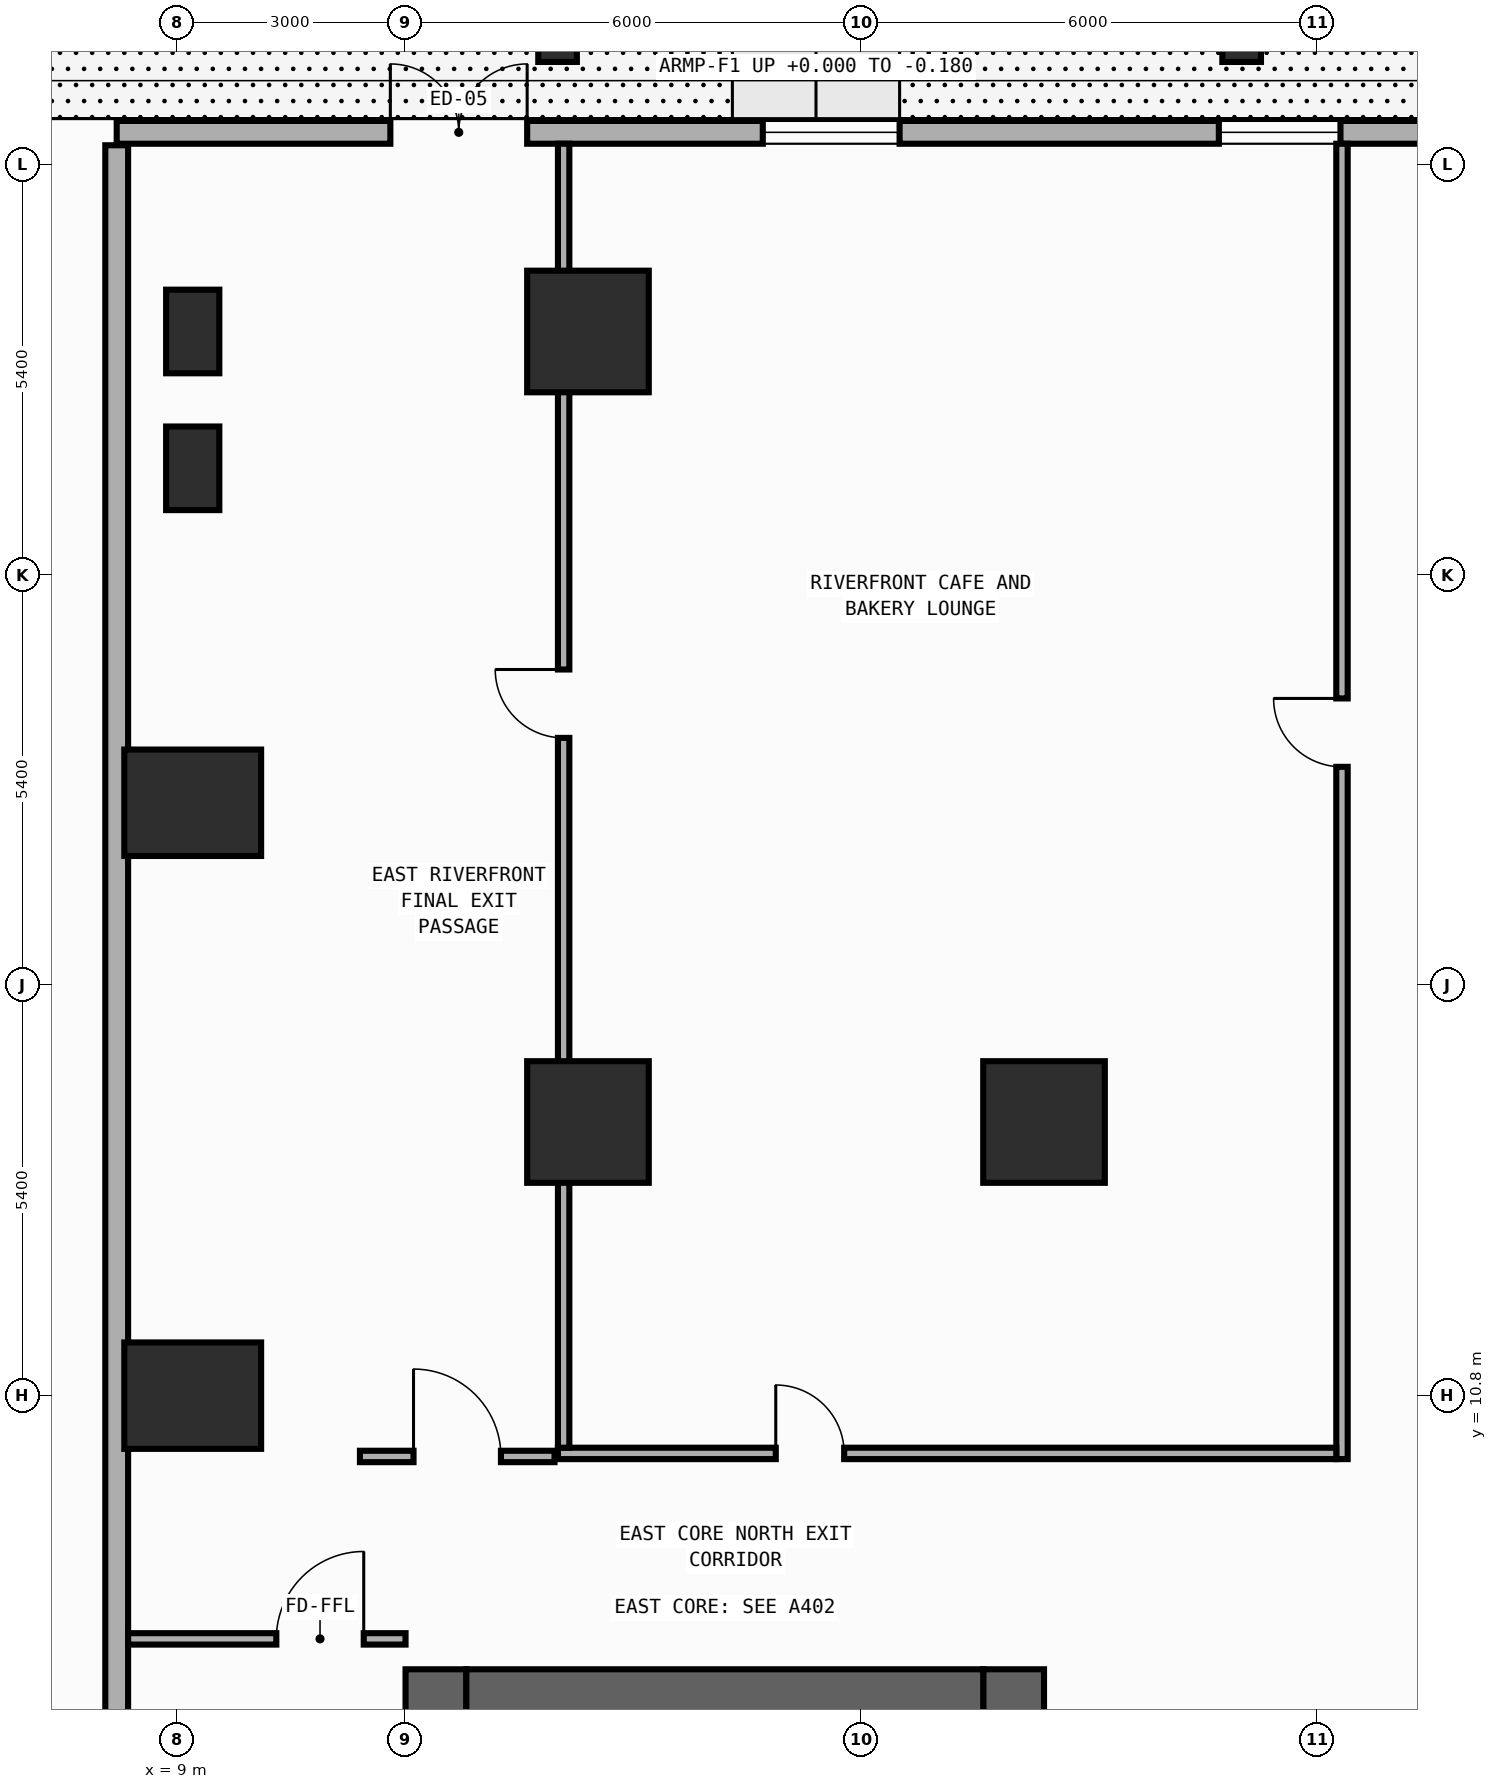
"""IFC4 building model, lengths in metres.
Left out: names, types, materials, properties, quantities, classifications, styles, units other than length and angle.
Written with IfcOpenShell. Run it as: python <this file> out.ifc"""

import sys

from ifc_helpers import new_model, si_unit, direction, frame, frame_2d, origin, origin_2d, place, context, subcontext, project, spatial, rectangle, hollow_circle, extrude, element, fill, save


model = new_model("IFC4")
c1 = context("Model", 3, precision=1e-05, world=origin(), true_north=direction((0.0, 1.0)))
c2 = subcontext(c1, "Body", "Model", "MODEL_VIEW")
j1 = project(units=[si_unit("LENGTHUNIT", "METRE"), si_unit("PLANEANGLEUNIT", "RADIAN")], contexts=[c1])
p1 = place(None, origin())
s1 = spatial("IfcSite", under=j1, at=p1, CompositionType="ELEMENT")
p2 = place(p1, origin())
s2 = spatial("IfcBuilding", under=s1, at=p2, CompositionType="ELEMENT")
p3 = place(p2, origin())
s3 = spatial("IfcBuildingStorey", under=s2, at=p3, CompositionType="ELEMENT", Elevation=0.0)
for number, where, z_axis, x_axis in (
    (1, (14.0, 28.6, -0.2), (0.0, 0.0, 1.0), (1.0, 0.0, 0.0)),
    (2, (23.0, 28.6, -0.2), (0.0, 0.0, 1.0), (1.0, 0.0, 0.0)),
):
    element("IfcColumn", number, at=place(p3, frame(where, z_axis=z_axis, x_axis=x_axis)), inside=s3, PredefinedType="COLUMN", context=c2, shape_type="SweptSolid", body=[
        extrude(hollow_circle(Radius=0.254, WallThickness=0.025, at=origin_2d()), origin(), (0.0, 0.0, 1.0), 5.6),
    ])
p4 = place(p3, frame((12.4, -19.8, 0.0), z_axis=(0.0, 0.0, 1.0), x_axis=(0.0, 1.0, 0.0)))
e3 = element("IfcWall", 3, at=p4, inside=s3, PredefinedType="SHEAR", context=c2, shape_type="SweptSolid", body=[
    extrude(rectangle(XDim=27.0, YDim=0.8, at=frame_2d((13.5, 0.0))), origin(), (0.0, 0.0, 1.0), 5.7),
])
p5 = place(p4, frame((23.05, 0.0, 0.0)))
e4 = element("IfcOpeningElement", 4, at=p5, cuts=e3, PredefinedType="OPENING", context=c2, shape_type="SweptSolid", body=[
    extrude(rectangle(XDim=1.1, YDim=2.2, at=frame_2d((0.55, 1.1))), frame((0.0, 0.41, 0.0), z_axis=(0.0, -1.0, 0.0), x_axis=(1.0, 0.0, 0.0)), (0.0, 0.0, 1.0), 0.82),
])
p6 = place(p4, frame((19.85, 0.0, 0.0)))
e5 = element("IfcOpeningElement", 5, at=p6, cuts=e3, PredefinedType="OPENING", context=c2, shape_type="SweptSolid", body=[
    extrude(rectangle(XDim=1.1, YDim=2.2, at=frame_2d((0.55, 1.1))), frame((0.0, 0.41, 0.0), z_axis=(0.0, -1.0, 0.0), x_axis=(1.0, 0.0, 0.0)), (0.0, 0.0, 1.0), 0.82),
])
p7 = place(p4, frame((16.65, 0.0, 0.0)))
e6 = element("IfcOpeningElement", 6, at=p7, cuts=e3, PredefinedType="OPENING", context=c2, shape_type="SweptSolid", body=[
    extrude(rectangle(XDim=1.1, YDim=2.2, at=frame_2d((0.55, 1.1))), frame((0.0, 0.41, 0.0), z_axis=(0.0, -1.0, 0.0), x_axis=(1.0, 0.0, 0.0)), (0.0, 0.0, 1.0), 0.82),
])
p8 = place(p4, frame((10.175, 0.0, 0.0)))
e7 = element("IfcOpeningElement", 7, at=p8, cuts=e3, PredefinedType="OPENING", context=c2, shape_type="SweptSolid", body=[
    extrude(rectangle(XDim=0.85, YDim=2.1, at=frame_2d((0.425, 1.05))), frame((0.0, 0.41, 0.0), z_axis=(0.0, -1.0, 0.0), x_axis=(1.0, 0.0, 0.0)), (0.0, 0.0, 1.0), 0.82),
])
p9 = place(p4, frame((12.725, 0.0, 0.0)))
e8 = element("IfcOpeningElement", 8, at=p9, cuts=e3, PredefinedType="OPENING", context=c2, shape_type="SweptSolid", body=[
    extrude(rectangle(XDim=1.15, YDim=2.2, at=frame_2d((0.575, 1.1))), frame((0.0, 0.41, 0.0), z_axis=(0.0, -1.0, 0.0), x_axis=(1.0, 0.0, 0.0)), (0.0, 0.0, 1.0), 0.82),
])
p10 = place(p4, frame((25.125, 0.0, 0.0)))
e9 = element("IfcOpeningElement", 9, at=p10, cuts=e3, PredefinedType="OPENING", context=c2, shape_type="SweptSolid", body=[
    extrude(rectangle(XDim=0.85, YDim=2.1, at=frame_2d((0.425, 1.05))), frame((0.0, 0.41, 0.0), z_axis=(0.0, -1.0, 0.0), x_axis=(1.0, 0.0, 0.0)), (0.0, 0.0, 1.0), 0.82),
])
p11 = place(p3, frame((20.0, -19.8, 0.0), z_axis=(0.0, 0.0, 1.0), x_axis=(0.0, 1.0, 0.0)))
e10 = element("IfcWall", 10, at=p11, inside=s3, PredefinedType="SHEAR", context=c2, shape_type="SweptSolid", body=[
    extrude(rectangle(XDim=27.0, YDim=0.8, at=frame_2d((13.5, 0.0))), origin(), (0.0, 0.0, 1.0), 5.7),
])
p12 = place(p3, frame((12.8, 6.8, 0.0), z_axis=(0.0, 0.0, 1.0), x_axis=(1.0, 0.0, 0.0)))
e11 = element("IfcWall", 11, at=p12, inside=s3, PredefinedType="SHEAR", context=c2, shape_type="SweptSolid", body=[
    extrude(rectangle(XDim=6.8, YDim=0.8, at=frame_2d((3.4, 0.0))), origin(), (0.0, 0.0, 1.0), 5.7),
])
for number, where, z_axis, x_axis in (
    (12, (9.2, 10.8, 0.0), (0.0, 0.0, 1.0), (1.0, 0.0, 0.0)),
    (13, (9.2, 18.6, 0.0), (0.0, 0.0, 1.0), (1.0, 0.0, 0.0)),
):
    element("IfcColumn", number, at=place(p3, frame(where, z_axis=z_axis, x_axis=x_axis)), inside=s3, PredefinedType="COLUMN", context=c2, shape_type="SweptSolid", body=[
        extrude(rectangle(XDim=1.8, YDim=1.4, at=origin_2d()), origin(), (0.0, 0.0, 1.0), 6.0),
    ])
for number, where, z_axis, x_axis in (
    (14, (20.4, 14.4, 0.0), (0.0, 0.0, 1.0), (1.0, 0.0, 0.0)),
    (15, (14.4, 14.4, 0.0), (0.0, 0.0, 1.0), (1.0, 0.0, 0.0)),
):
    element("IfcColumn", number, at=place(p3, frame(where, z_axis=z_axis, x_axis=x_axis)), inside=s3, PredefinedType="COLUMN", context=c2, shape_type="SweptSolid", body=[
        extrude(rectangle(XDim=1.6, YDim=1.6, at=origin_2d()), origin(), (0.0, 0.0, 1.0), 6.0),
    ])
p13 = place(p3, frame((9.2, 24.8, 0.0), z_axis=(0.0, 0.0, 1.0), x_axis=(1.0, 0.0, 0.0)))
e16 = element("IfcColumn", 16, at=p13, inside=s3, PredefinedType="PILASTER", context=c2, shape_type="SweptSolid", body=[
    extrude(rectangle(XDim=0.7, YDim=1.1, at=origin_2d()), origin(), (0.0, 0.0, 1.0), 6.0),
])
p14 = place(p3, frame((14.4, 24.8, 0.0), z_axis=(0.0, 0.0, 1.0), x_axis=(1.0, 0.0, 0.0)))
e17 = element("IfcColumn", 17, at=p14, inside=s3, PredefinedType="COLUMN", context=c2, shape_type="SweptSolid", body=[
    extrude(rectangle(XDim=1.6, YDim=1.6, at=origin_2d()), origin(), (0.0, 0.0, 1.0), 6.0),
])
p15 = place(p3, frame((9.2, 23.0, 0.0), z_axis=(0.0, 0.0, 1.0), x_axis=(1.0, 0.0, 0.0)))
e18 = element("IfcColumn", 18, at=p15, inside=s3, PredefinedType="PILASTER", context=c2, shape_type="SweptSolid", body=[
    extrude(rectangle(XDim=0.7, YDim=1.1, at=origin_2d()), origin(), (0.0, 0.0, 1.0), 6.0),
])
p16 = place(p3, frame((8.2, 27.42, 0.0), z_axis=(0.0, 0.0, 1.0), x_axis=(1.0, 0.0, 0.0)))
e19 = element("IfcWall", 19, at=p16, inside=s3, PredefinedType="STANDARD", context=c2, shape_type="SweptSolid", body=[
    extrude(rectangle(XDim=26.4, YDim=0.3, at=frame_2d((13.2, 0.0))), origin(), (0.0, 0.0, 1.0), 5.7),
])
p17 = place(p16, frame((3.6, 0.0, 0.0)))
e20 = element("IfcOpeningElement", 20, at=p17, cuts=e19, PredefinedType="OPENING", context=c2, shape_type="SweptSolid", body=[
    extrude(rectangle(XDim=1.8, YDim=2.4, at=frame_2d((0.9, 1.2))), frame((0.0, 0.16, 0.0), z_axis=(0.0, -1.0, 0.0), x_axis=(1.0, 0.0, 0.0)), (0.0, 0.0, 1.0), 0.32),
])
p18 = place(p16, frame((8.5, 0.0, 0.85)))
e21 = element("IfcOpeningElement", 21, at=p18, cuts=e19, PredefinedType="OPENING", context=c2, shape_type="SweptSolid", body=[
    extrude(rectangle(XDim=1.8, YDim=1.9, at=frame_2d((0.9, 0.95))), frame((0.0, 0.16, 0.0), z_axis=(0.0, -1.0, 0.0), x_axis=(1.0, 0.0, 0.0)), (0.0, 0.0, 1.0), 0.32),
])
p19 = place(p16, frame((14.5, 0.0, 0.85)))
e22 = element("IfcOpeningElement", 22, at=p19, cuts=e19, PredefinedType="OPENING", context=c2, shape_type="SweptSolid", body=[
    extrude(rectangle(XDim=1.6, YDim=1.85, at=frame_2d((0.8, 0.925))), frame((0.0, 0.16, 0.0), z_axis=(0.0, -1.0, 0.0), x_axis=(1.0, 0.0, 0.0)), (0.0, 0.0, 1.0), 0.32),
])
p20 = place(p3, frame((8.2, -27.25, 0.0), z_axis=(0.0, 0.0, 1.0), x_axis=(0.0, 1.0, 0.0)))
e23 = element("IfcWall", 23, at=p20, inside=s3, PredefinedType="STANDARD", context=c2, shape_type="SweptSolid", body=[
    extrude(rectangle(XDim=54.5, YDim=0.3, at=frame_2d((27.25, 0.0))), origin(), (0.0, 0.0, 1.0), 5.7),
])
p21 = place(p20, frame((4.4, 0.0, 0.0)))
e24 = element("IfcOpeningElement", 24, at=p21, cuts=e23, PredefinedType="OPENING", context=c2, shape_type="SweptSolid", body=[
    extrude(rectangle(XDim=2.0, YDim=2.4, at=frame_2d((1.0, 1.2))), frame((0.0, 0.16, 0.0), z_axis=(0.0, -1.0, 0.0), x_axis=(1.0, 0.0, 0.0)), (0.0, 0.0, 1.0), 0.32),
])
p22 = place(p20, frame((20.0, 0.0, 0.85)))
e25 = element("IfcOpeningElement", 25, at=p22, cuts=e23, PredefinedType="OPENING", context=c2, shape_type="SweptSolid", body=[
    extrude(rectangle(XDim=1.2, YDim=1.65, at=frame_2d((0.6, 0.825))), frame((0.0, 0.16, 0.0), z_axis=(0.0, -1.0, 0.0), x_axis=(1.0, 0.0, 0.0)), (0.0, 0.0, 1.0), 0.32),
])
p23 = place(p20, frame((30.0, 0.0, 0.85)))
e26 = element("IfcOpeningElement", 26, at=p23, cuts=e23, PredefinedType="OPENING", context=c2, shape_type="SweptSolid", body=[
    extrude(rectangle(XDim=2.6, YDim=1.95, at=frame_2d((1.3, 0.975))), frame((0.0, 0.16, 0.0), z_axis=(0.0, -1.0, 0.0), x_axis=(1.0, 0.0, 0.0)), (0.0, 0.0, 1.0), 0.32),
])
p24 = place(p3, frame((8.35, 7.6, 0.0), z_axis=(0.0, 0.0, 1.0), x_axis=(1.0, 0.0, 0.0)))
e27 = element("IfcWall", 27, at=p24, inside=s3, PredefinedType="PARTITIONING", context=c2, shape_type="SweptSolid", body=[
    extrude(rectangle(XDim=3.65, YDim=0.15, at=frame_2d((1.825, 0.0))), origin(), (0.0, 0.0, 1.0), 5.7),
])
p25 = place(p24, frame((1.95, 0.0, 0.0)))
e28 = element("IfcOpeningElement", 28, at=p25, cuts=e27, PredefinedType="OPENING", context=c2, shape_type="SweptSolid", body=[
    extrude(rectangle(XDim=1.15, YDim=2.2, at=frame_2d((0.575, 1.1))), frame((0.0, 0.085, 0.0), z_axis=(0.0, -1.0, 0.0), x_axis=(1.0, 0.0, 0.0)), (0.0, 0.0, 1.0), 0.17),
])
p26 = place(p3, frame((11.4, 10.0, 0.0), z_axis=(0.0, 0.0, 1.0), x_axis=(1.0, 0.0, 0.0)))
e29 = element("IfcWall", 29, at=p26, inside=s3, PredefinedType="PARTITIONING", context=c2, shape_type="SweptSolid", body=[
    extrude(rectangle(XDim=2.56, YDim=0.15, at=frame_2d((1.28, 0.0))), origin(), (0.0, 0.0, 1.0), 5.7),
])
p27 = place(p26, frame((0.705, 0.0, 0.0)))
e30 = element("IfcOpeningElement", 30, at=p27, cuts=e29, PredefinedType="OPENING", context=c2, shape_type="SweptSolid", body=[
    extrude(rectangle(XDim=1.15, YDim=2.2, at=frame_2d((0.575, 1.1))), frame((0.0, 0.085, 0.0), z_axis=(0.0, -1.0, 0.0), x_axis=(1.0, 0.0, 0.0)), (0.0, 0.0, 1.0), 0.17),
])
p28 = place(p3, frame((24.32, 9.965, 0.0), z_axis=(0.0, 0.0, 1.0), x_axis=(0.0, 1.0, 0.0)))
e31 = element("IfcWall", 31, at=p28, inside=s3, PredefinedType="PARTITIONING", context=c2, shape_type="SweptSolid", body=[
    extrude(rectangle(XDim=17.305, YDim=0.15, at=frame_2d((8.652, 0.0))), origin(), (0.0, 0.0, 1.0), 5.7),
])
p29 = place(p28, frame((9.107, 0.0, 0.0)))
e32 = element("IfcOpeningElement", 32, at=p29, cuts=e31, PredefinedType="OPENING", context=c2, shape_type="SweptSolid", body=[
    extrude(rectangle(XDim=0.9, YDim=2.15, at=frame_2d((0.45, 1.075))), frame((0.0, 0.085, 0.0), z_axis=(0.0, -1.0, 0.0), x_axis=(1.0, 0.0, 0.0)), (0.0, 0.0, 1.0), 0.17),
])
p30 = place(p3, frame((14.005, 10.04, 0.0), z_axis=(0.0, 0.0, 1.0), x_axis=(1.0, 0.0, 0.0)))
e33 = element("IfcWall", 33, at=p30, inside=s3, PredefinedType="PARTITIONING", context=c2, shape_type="SweptSolid", body=[
    extrude(rectangle(XDim=10.24, YDim=0.15, at=frame_2d((5.12, 0.0))), origin(), (0.0, 0.0, 1.0), 5.7),
])
p31 = place(p30, frame((2.866, 0.0, 0.0)))
e34 = element("IfcOpeningElement", 34, at=p31, cuts=e33, PredefinedType="OPENING", context=c2, shape_type="SweptSolid", body=[
    extrude(rectangle(XDim=0.9, YDim=2.15, at=frame_2d((0.45, 1.075))), frame((0.0, 0.085, 0.0), z_axis=(0.0, -1.0, 0.0), x_axis=(1.0, 0.0, 0.0)), (0.0, 0.0, 1.0), 0.17),
])
p32 = place(p3, frame((14.08, 10.115, 0.0), z_axis=(0.0, 0.0, 1.0), x_axis=(0.0, 1.0, 0.0)))
e35 = element("IfcWall", 35, at=p32, inside=s3, PredefinedType="PARTITIONING", context=c2, shape_type="SweptSolid", body=[
    extrude(rectangle(XDim=17.155, YDim=0.15, at=frame_2d((8.578, 0.0))), origin(), (0.0, 0.0, 1.0), 4.8),
])
p33 = place(p32, frame((9.338, 0.0, 0.0)))
e36 = element("IfcOpeningElement", 36, at=p33, cuts=e35, PredefinedType="OPENING", context=c2, shape_type="SweptSolid", body=[
    extrude(rectangle(XDim=0.9, YDim=2.15, at=frame_2d((0.45, 1.075))), frame((0.0, 0.085, 0.0), z_axis=(0.0, -1.0, 0.0), x_axis=(1.0, 0.0, 0.0)), (0.0, 0.0, 1.0), 0.17),
])
p34 = place(p17, origin())
e37 = element("IfcDoor", 37, at=p34, inside=s3, OperationType="DOUBLE_DOOR_SINGLE_SWING", PredefinedType="DOOR", context=c2, shape_type="SweptSolid", body=[
    extrude(rectangle(XDim=1.8, YDim=2.4, at=frame_2d((0.9, 1.2))), frame((0.0, 0.025, 0.0), z_axis=(0.0, -1.0, 0.0), x_axis=(1.0, 0.0, 0.0)), (0.0, 0.0, 1.0), 0.05),
])
fill(e20, e37)
p35 = place(p18, origin())
e38 = element("IfcWindow", 38, at=p35, inside=s3, PartitioningType="SINGLE_PANEL", PredefinedType="WINDOW", context=c2, shape_type="SweptSolid", body=[
    extrude(rectangle(XDim=1.8, YDim=1.9, at=frame_2d((0.9, 0.95))), frame((0.0, 0.03, 0.0), z_axis=(0.0, -1.0, 0.0), x_axis=(1.0, 0.0, 0.0)), (0.0, 0.0, 1.0), 0.06),
])
fill(e21, e38)
p36 = place(p19, origin())
e39 = element("IfcWindow", 39, at=p36, inside=s3, PartitioningType="SINGLE_PANEL", PredefinedType="WINDOW", context=c2, shape_type="SweptSolid", body=[
    extrude(rectangle(XDim=1.6, YDim=1.85, at=frame_2d((0.8, 0.925))), frame((0.0, 0.03, 0.0), z_axis=(0.0, -1.0, 0.0), x_axis=(1.0, 0.0, 0.0)), (0.0, 0.0, 1.0), 0.06),
])
fill(e22, e39)
p37 = place(p25, origin())
e40 = element("IfcDoor", 40, at=p37, inside=s3, OperationType="SINGLE_SWING_RIGHT", PredefinedType="DOOR", context=c2, shape_type="SweptSolid", body=[
    extrude(rectangle(XDim=1.15, YDim=2.2, at=frame_2d((0.575, 1.1))), frame((0.0, 0.025, 0.0), z_axis=(0.0, -1.0, 0.0), x_axis=(1.0, 0.0, 0.0)), (0.0, 0.0, 1.0), 0.05),
])
fill(e28, e40)
p38 = place(p27, origin())
e41 = element("IfcDoor", 41, at=p38, inside=s3, OperationType="SINGLE_SWING_LEFT", PredefinedType="DOOR", context=c2, shape_type="SweptSolid", body=[
    extrude(rectangle(XDim=1.15, YDim=2.2, at=frame_2d((0.575, 1.1))), frame((0.0, 0.025, 0.0), z_axis=(0.0, -1.0, 0.0), x_axis=(1.0, 0.0, 0.0)), (0.0, 0.0, 1.0), 0.05),
])
fill(e30, e41)
p39 = place(p29, origin())
e42 = element("IfcDoor", 42, at=p39, inside=s3, OperationType="SINGLE_SWING_RIGHT", PredefinedType="DOOR", context=c2, shape_type="SweptSolid", body=[
    extrude(rectangle(XDim=0.9, YDim=2.15, at=frame_2d((0.45, 1.075))), frame((0.0, 0.025, 0.0), z_axis=(0.0, -1.0, 0.0), x_axis=(1.0, 0.0, 0.0)), (0.0, 0.0, 1.0), 0.05),
])
fill(e32, e42)
p40 = place(p31, origin())
e43 = element("IfcDoor", 43, at=p40, inside=s3, OperationType="SINGLE_SWING_LEFT", PredefinedType="DOOR", context=c2, shape_type="SweptSolid", body=[
    extrude(rectangle(XDim=0.9, YDim=2.15, at=frame_2d((0.45, 1.075))), frame((0.0, 0.025, 0.0), z_axis=(0.0, -1.0, 0.0), x_axis=(1.0, 0.0, 0.0)), (0.0, 0.0, 1.0), 0.05),
])
fill(e34, e43)
p41 = place(p33, origin())
e44 = element("IfcDoor", 44, at=p41, inside=s3, OperationType="SINGLE_SWING_RIGHT", PredefinedType="DOOR", context=c2, shape_type="SweptSolid", body=[
    extrude(rectangle(XDim=0.9, YDim=2.15, at=frame_2d((0.45, 1.075))), frame((0.0, 0.025, 0.0), z_axis=(0.0, -1.0, 0.0), x_axis=(1.0, 0.0, 0.0)), (0.0, 0.0, 1.0), 0.05),
])
fill(e36, e44)
save(model, sys.argv[1])
